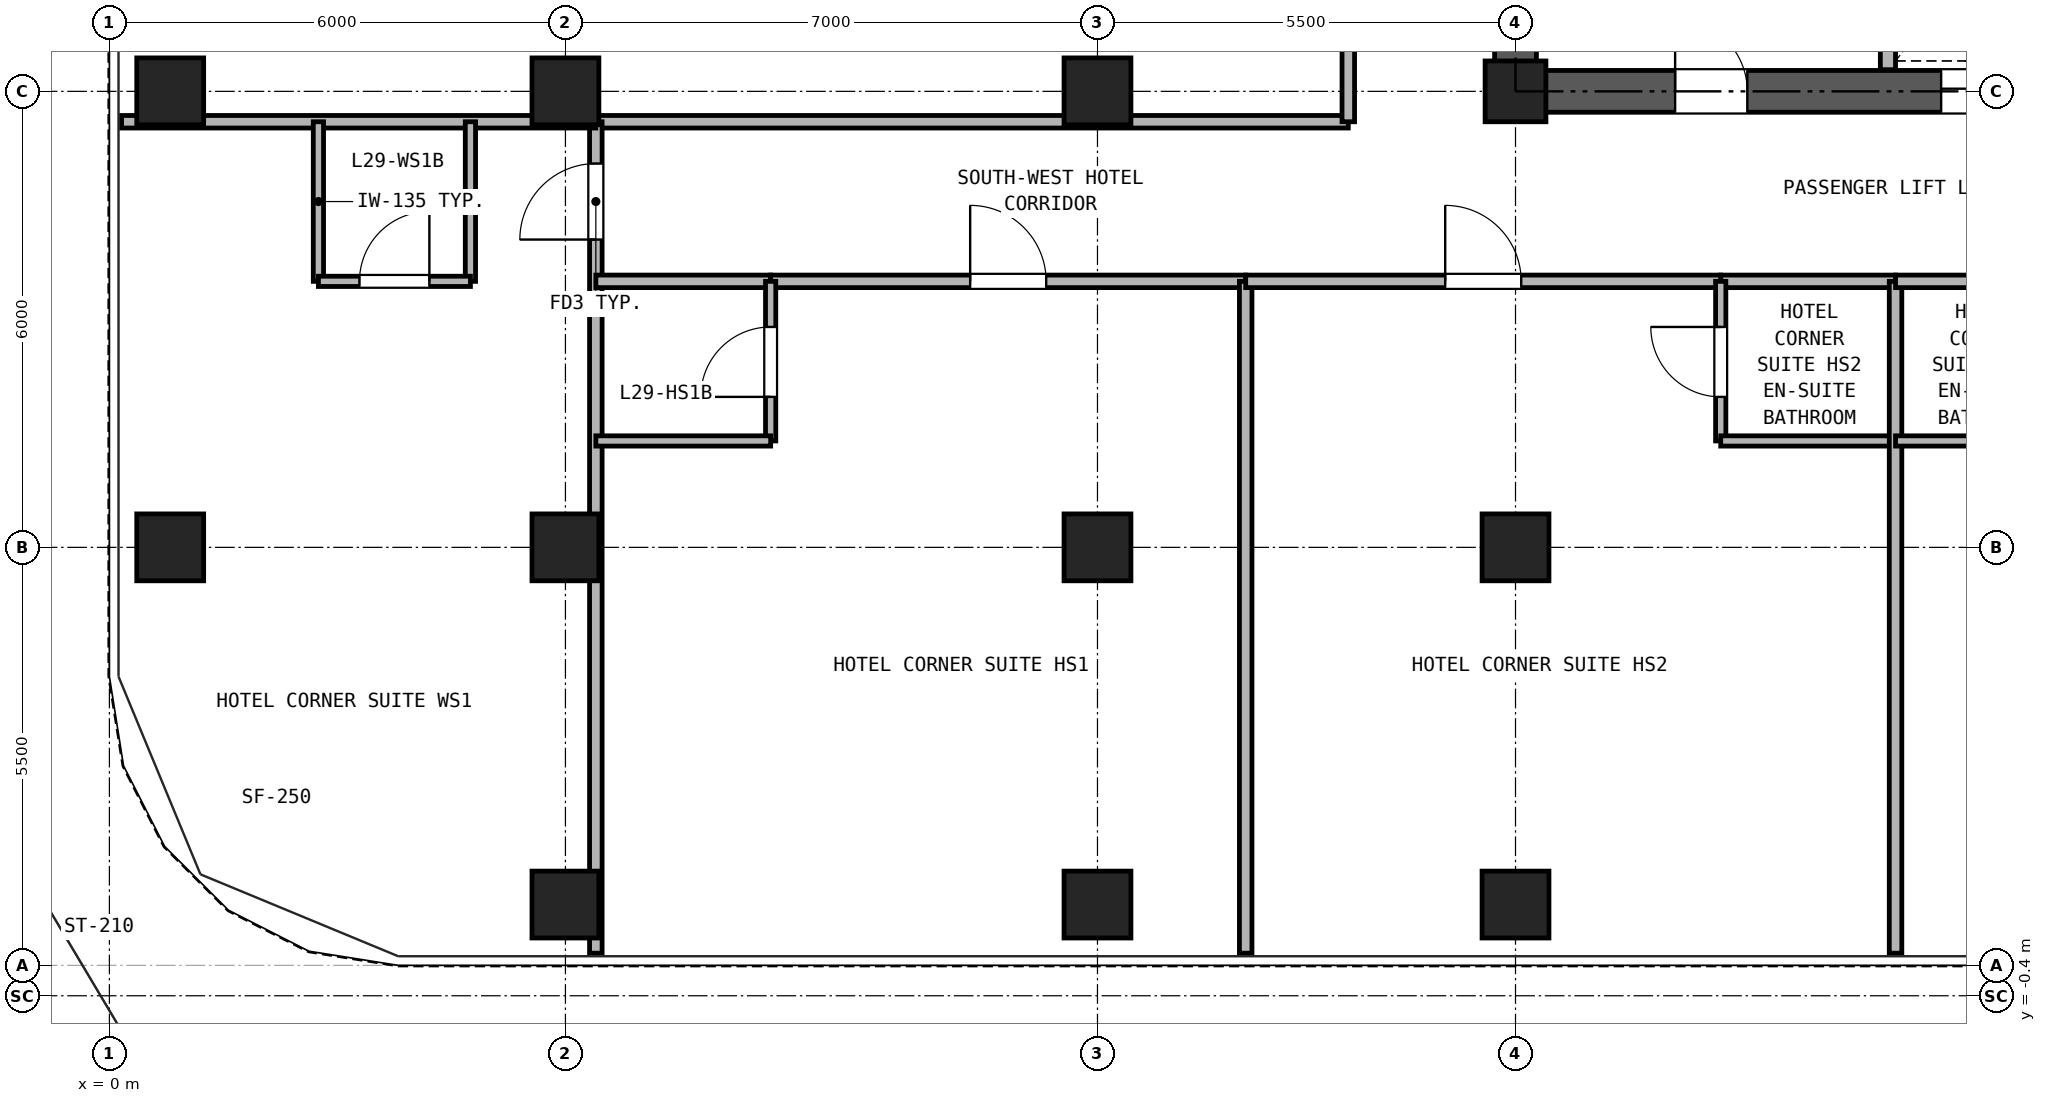
"""IFC4 building model, lengths in metres.
Left out: names, types, materials, properties, quantities, classifications, styles, units other than length and angle.
Written with IfcOpenShell. Run it as: python <this file> out.ifc"""

import sys

from ifc_helpers import new_model, si_unit, direction, frame, frame_2d, origin, origin_2d, place, context, subcontext, project, spatial, rectangle, hollow_rectangle, extrude, source, transform, mapped, element, fill, save


model = new_model("IFC4")
c1 = context("Model", 3, precision=1e-05, world=origin(), true_north=direction((0.0, 1.0)))
c2 = subcontext(c1, "Body", "Model", "MODEL_VIEW")
j1 = project(units=[si_unit("LENGTHUNIT", "METRE"), si_unit("PLANEANGLEUNIT", "RADIAN")], contexts=[c1])
p1 = place(None, origin())
s1 = spatial("IfcSite", under=j1, at=p1, CompositionType="ELEMENT")
p2 = place(p1, origin())
s2 = spatial("IfcBuilding", under=s1, at=p2, CompositionType="ELEMENT")
p3 = place(p2, frame((0.0, 0.0, 108.7)))
s3 = spatial("IfcBuildingStorey", under=s2, at=p3, CompositionType="ELEMENT", Elevation=108.7)
m1 = source(origin(), c2, "Body", "SweptSolid", [
    extrude(hollow_rectangle(XDim=0.88, YDim=0.88, WallThickness=0.05, at=origin_2d()), origin(), (0.0, 0.0, 1.0), 2.95),
])
for number, where, z_axis, x_axis in (
    (1, (6.0, 0.8, 0.0), (0.0, 0.0, 1.0), (1.0, 0.0, 0.0)),
    (2, (13.0, 0.8, 0.0), (0.0, 0.0, 1.0), (1.0, 0.0, 0.0)),
    (3, (18.5, 0.8, 0.0), (0.0, 0.0, 1.0), (1.0, 0.0, 0.0)),
    (4, (0.8, 5.5, 0.0), (0.0, 0.0, 1.0), (1.0, 0.0, 0.0)),
    (5, (0.8, 11.5, 0.0), (0.0, 0.0, 1.0), (1.0, 0.0, 0.0)),
    (6, (6.0, 5.5, 0.0), (0.0, 0.0, 1.0), (1.0, 0.0, 0.0)),
    (7, (6.0, 11.5, 0.0), (0.0, 0.0, 1.0), (1.0, 0.0, 0.0)),
    (8, (13.0, 5.5, 0.0), (0.0, 0.0, 1.0), (1.0, 0.0, 0.0)),
    (9, (13.0, 11.5, 0.0), (0.0, 0.0, 1.0), (1.0, 0.0, 0.0)),
    (10, (18.5, 5.5, 0.0), (0.0, 0.0, 1.0), (1.0, 0.0, 0.0)),
):
    element("IfcColumn", number, at=place(p3, frame(where, z_axis=z_axis, x_axis=x_axis)), inside=s3, PredefinedType="COLUMN", context=c2, shape_type="MappedRepresentation", body=[
        mapped(m1, transform((0.0, 0.0, 0.0), x_axis=(1.0, 0.0, 0.0), y_axis=(0.0, 1.0, 0.0), z_axis=(0.0, 0.0, 1.0), scale=1.0)),
    ])
m2 = source(origin(), c2, "Body", "SweptSolid", [
    extrude(hollow_rectangle(XDim=0.8, YDim=0.8, WallThickness=0.045, at=origin_2d()), origin(), (0.0, 0.0, 1.0), 2.95),
])
p4 = place(p3, frame((18.5, 11.5, 0.0), z_axis=(0.0, 0.0, 1.0), x_axis=(1.0, 0.0, 0.0)))
e11 = element("IfcColumn", 11, at=p4, inside=s3, PredefinedType="COLUMN", context=c2, shape_type="MappedRepresentation", body=[
    mapped(m2, transform((0.0, 0.0, 0.0), x_axis=(1.0, 0.0, 0.0), y_axis=(0.0, 1.0, 0.0), z_axis=(0.0, 0.0, 1.0), scale=1.0)),
])
p5 = place(p3, frame((18.225, 11.5, 0.0), z_axis=(0.0, 0.0, 1.0), x_axis=(1.0, 0.0, 0.0)))
e12 = element("IfcWall", 12, at=p5, inside=s3, PredefinedType="SHEAR", context=c2, shape_type="SweptSolid", body=[
    extrude(rectangle(XDim=10.55, YDim=0.55, at=frame_2d((5.275, 0.0))), origin(), (0.0, 0.0, 1.0), 2.95),
])
p6 = place(p5, frame((2.375, 0.0, 0.0)))
e13 = element("IfcOpeningElement", 13, at=p6, cuts=e12, PredefinedType="OPENING", context=c2, shape_type="SweptSolid", body=[
    extrude(rectangle(XDim=0.95, YDim=2.15, at=frame_2d((0.475, 1.075))), frame((0.0, 0.285, 0.0), z_axis=(0.0, -1.0, 0.0), x_axis=(1.0, 0.0, 0.0)), (0.0, 0.0, 1.0), 0.57),
])
p7 = place(p5, frame((5.875, 0.0, 0.0)))
e14 = element("IfcOpeningElement", 14, at=p7, cuts=e12, PredefinedType="OPENING", context=c2, shape_type="SweptSolid", body=[
    extrude(rectangle(XDim=1.1, YDim=2.25, at=frame_2d((0.55, 1.125))), frame((0.0, 0.285, 0.0), z_axis=(0.0, -1.0, 0.0), x_axis=(1.0, 0.0, 0.0)), (0.0, 0.0, 1.0), 0.57),
])
p8 = place(p5, frame((8.275, 0.0, 0.0)))
e15 = element("IfcOpeningElement", 15, at=p8, cuts=e12, PredefinedType="OPENING", context=c2, shape_type="SweptSolid", body=[
    extrude(rectangle(XDim=1.1, YDim=2.25, at=frame_2d((0.55, 1.125))), frame((0.0, 0.285, 0.0), z_axis=(0.0, -1.0, 0.0), x_axis=(1.0, 0.0, 0.0)), (0.0, 0.0, 1.0), 0.57),
])
p9 = place(p3, frame((18.5, 11.775, 0.0), z_axis=(0.0, 0.0, 1.0), x_axis=(0.0, 1.0, 0.0)))
e16 = element("IfcWall", 16, at=p9, inside=s3, PredefinedType="SHEAR", context=c2, shape_type="SweptSolid", body=[
    extrude(rectangle(XDim=16.7, YDim=0.55, at=frame_2d((8.35, 0.0))), origin(), (0.0, 0.0, 1.0), 2.95),
])
p10 = place(p9, frame((7.375, 0.0, 0.0)))
e17 = element("IfcOpeningElement", 17, at=p10, cuts=e16, PredefinedType="OPENING", context=c2, shape_type="SweptSolid", body=[
    extrude(rectangle(XDim=1.15, YDim=2.2, at=frame_2d((0.575, 1.1))), frame((0.0, 0.285, 0.0), z_axis=(0.0, -1.0, 0.0), x_axis=(1.0, 0.0, 0.0)), (0.0, 0.0, 1.0), 0.57),
])
p11 = place(p3, frame((23.4, 11.785, 0.0), z_axis=(0.0, 0.0, 1.0), x_axis=(0.0, 1.0, 0.0)))
e18 = element("IfcWall", 18, at=p11, inside=s3, PredefinedType="PARTITIONING", context=c2, shape_type="SweptSolid", body=[
    extrude(rectangle(XDim=3.215, YDim=0.2, at=frame_2d((1.607, 0.0))), origin(), (0.0, 0.0, 1.0), 2.95),
])
p12 = place(p3, frame((6.4, 11.1, 0.0), z_axis=(0.0, 0.0, 1.0), x_axis=(1.0, 0.0, 0.0)))
e19 = element("IfcWall", 19, at=p12, inside=s3, PredefinedType="PARTITIONING", context=c2, shape_type="SweptSolid", body=[
    extrude(rectangle(XDim=9.9, YDim=0.165, at=frame_2d((4.95, 0.0))), origin(), (0.0, 0.0, 1.0), 2.95),
])
p13 = place(p3, frame((16.3, 11.1, 0.0), z_axis=(0.0, 0.0, 1.0), x_axis=(0.0, 1.0, 0.0)))
e20 = element("IfcWall", 20, at=p13, inside=s3, PredefinedType="PARTITIONING", context=c2, shape_type="SweptSolid", body=[
    extrude(rectangle(XDim=18.45, YDim=0.165, at=frame_2d((9.225, 0.0))), origin(), (0.0, 0.0, 1.0), 2.95),
])
p14 = place(p13, frame((2.5, 0.0, 0.0)))
e21 = element("IfcOpeningElement", 21, at=p14, cuts=e20, PredefinedType="OPENING", context=c2, shape_type="SweptSolid", body=[
    extrude(rectangle(XDim=0.95, YDim=2.15, at=frame_2d((0.475, 1.075))), frame((0.0, 0.093, 0.0), z_axis=(0.0, -1.0, 0.0), x_axis=(1.0, 0.0, 0.0)), (0.0, 0.0, 1.0), 0.185),
])
p15 = place(p13, frame((8.5, 0.0, 0.0)))
e22 = element("IfcOpeningElement", 22, at=p15, cuts=e20, PredefinedType="OPENING", context=c2, shape_type="SweptSolid", body=[
    extrude(rectangle(XDim=0.95, YDim=2.15, at=frame_2d((0.475, 1.075))), frame((0.0, 0.093, 0.0), z_axis=(0.0, -1.0, 0.0), x_axis=(1.0, 0.0, 0.0)), (0.0, 0.0, 1.0), 0.185),
])
p16 = place(p13, frame((14.725, 0.0, 0.0)))
e23 = element("IfcOpeningElement", 23, at=p16, cuts=e20, PredefinedType="OPENING", context=c2, shape_type="SweptSolid", body=[
    extrude(rectangle(XDim=0.95, YDim=2.15, at=frame_2d((0.475, 1.075))), frame((0.0, 0.093, 0.0), z_axis=(0.0, -1.0, 0.0), x_axis=(1.0, 0.0, 0.0)), (0.0, 0.0, 1.0), 0.185),
])
p17 = place(p3, frame((6.4, 0.16, 0.0), z_axis=(0.0, 0.0, 1.0), x_axis=(0.0, 1.0, 0.0)))
e24 = element("IfcWall", 24, at=p17, inside=s3, PredefinedType="PARTITIONING", context=c2, shape_type="SweptSolid", body=[
    extrude(rectangle(XDim=10.94, YDim=0.165, at=frame_2d((5.47, 0.0))), origin(), (0.0, 0.0, 1.0), 2.95),
])
p18 = place(p17, frame((9.39, 0.0, 0.0)))
e25 = element("IfcOpeningElement", 25, at=p18, cuts=e24, PredefinedType="OPENING", context=c2, shape_type="SweptSolid", body=[
    extrude(rectangle(XDim=1.0, YDim=2.15, at=frame_2d((0.5, 1.075))), frame((0.0, 0.093, 0.0), z_axis=(0.0, -1.0, 0.0), x_axis=(1.0, 0.0, 0.0)), (0.0, 0.0, 1.0), 0.185),
])
p19 = place(p3, frame((0.16, 11.1, 0.0), z_axis=(0.0, 0.0, 1.0), x_axis=(1.0, 0.0, 0.0)))
e26 = element("IfcWall", 26, at=p19, inside=s3, PredefinedType="PARTITIONING", context=c2, shape_type="SweptSolid", body=[
    extrude(rectangle(XDim=6.24, YDim=0.165, at=frame_2d((3.12, 0.0))), origin(), (0.0, 0.0, 1.0), 2.95),
])
for number, where, z_axis, x_axis in (
    (27, (2.75, 9.0, 0.0), (0.0, 0.0, 1.0), (0.0, 1.0, 0.0)),
    (28, (4.75, 9.0, 0.0), (0.0, 0.0, 1.0), (0.0, 1.0, 0.0)),
):
    element("IfcWall", number, at=place(p3, frame(where, z_axis=z_axis, x_axis=x_axis)), inside=s3, PredefinedType="PARTITIONING", context=c2, shape_type="SweptSolid", body=[
        extrude(rectangle(XDim=2.1, YDim=0.135, at=frame_2d((1.05, 0.0))), origin(), (0.0, 0.0, 1.0), 2.95),
    ])
p20 = place(p3, frame((2.75, 9.0, 0.0), z_axis=(0.0, 0.0, 1.0), x_axis=(1.0, 0.0, 0.0)))
e29 = element("IfcWall", 29, at=p20, inside=s3, PredefinedType="PARTITIONING", context=c2, shape_type="SweptSolid", body=[
    extrude(rectangle(XDim=2.0, YDim=0.135, at=frame_2d((1.0, 0.0))), origin(), (0.0, 0.0, 1.0), 2.95),
])
p21 = place(p20, frame((0.54, 0.0, 0.0)))
e30 = element("IfcOpeningElement", 30, at=p21, cuts=e29, PredefinedType="OPENING", context=c2, shape_type="SweptSolid", body=[
    extrude(rectangle(XDim=0.92, YDim=2.1, at=frame_2d((0.46, 1.05))), frame((0.0, 0.077, 0.0), z_axis=(0.0, -1.0, 0.0), x_axis=(1.0, 0.0, 0.0)), (0.0, 0.0, 1.0), 0.155),
])
p22 = place(p3, frame((6.4, 9.0, 0.0), z_axis=(0.0, 0.0, 1.0), x_axis=(1.0, 0.0, 0.0)))
e31 = element("IfcWall", 31, at=p22, inside=s3, PredefinedType="PARTITIONING", context=c2, shape_type="SweptSolid", body=[
    extrude(rectangle(XDim=2.3, YDim=0.165, at=frame_2d((1.15, 0.0))), origin(), (0.0, 0.0, 1.0), 2.95),
])
p23 = place(p3, frame((8.7, 9.0, 0.0), z_axis=(0.0, 0.0, 1.0), x_axis=(1.0, 0.0, 0.0)))
e32 = element("IfcWall", 32, at=p23, inside=s3, PredefinedType="PARTITIONING", context=c2, shape_type="SweptSolid", body=[
    extrude(rectangle(XDim=6.25, YDim=0.165, at=frame_2d((3.125, 0.0))), origin(), (0.0, 0.0, 1.0), 2.95),
])
p24 = place(p23, frame((2.625, 0.0, 0.0)))
e33 = element("IfcOpeningElement", 33, at=p24, cuts=e32, PredefinedType="OPENING", context=c2, shape_type="SweptSolid", body=[
    extrude(rectangle(XDim=1.0, YDim=2.15, at=frame_2d((0.5, 1.075))), frame((0.0, 0.093, 0.0), z_axis=(0.0, -1.0, 0.0), x_axis=(1.0, 0.0, 0.0)), (0.0, 0.0, 1.0), 0.185),
])
p25 = place(p3, frame((8.7, 6.9, 0.0), z_axis=(0.0, 0.0, 1.0), x_axis=(0.0, 1.0, 0.0)))
e34 = element("IfcWall", 34, at=p25, inside=s3, PredefinedType="PARTITIONING", context=c2, shape_type="SweptSolid", body=[
    extrude(rectangle(XDim=2.1, YDim=0.135, at=frame_2d((1.05, 0.0))), origin(), (0.0, 0.0, 1.0), 2.95),
])
p26 = place(p25, frame((0.58, 0.0, 0.0)))
e35 = element("IfcOpeningElement", 35, at=p26, cuts=e34, PredefinedType="OPENING", context=c2, shape_type="SweptSolid", body=[
    extrude(rectangle(XDim=0.92, YDim=2.1, at=frame_2d((0.46, 1.05))), frame((0.0, 0.077, 0.0), z_axis=(0.0, -1.0, 0.0), x_axis=(1.0, 0.0, 0.0)), (0.0, 0.0, 1.0), 0.155),
])
p27 = place(p3, frame((6.4, 6.9, 0.0), z_axis=(0.0, 0.0, 1.0), x_axis=(1.0, 0.0, 0.0)))
e36 = element("IfcWall", 36, at=p27, inside=s3, PredefinedType="PARTITIONING", context=c2, shape_type="SweptSolid", body=[
    extrude(rectangle(XDim=2.3, YDim=0.135, at=frame_2d((1.15, 0.0))), origin(), (0.0, 0.0, 1.0), 2.95),
])
p28 = place(p3, frame((14.95, 0.16, 0.0), z_axis=(0.0, 0.0, 1.0), x_axis=(0.0, 1.0, 0.0)))
e37 = element("IfcWall", 37, at=p28, inside=s3, PredefinedType="PARTITIONING", context=c2, shape_type="SweptSolid", body=[
    extrude(rectangle(XDim=8.84, YDim=0.165, at=frame_2d((4.42, 0.0))), origin(), (0.0, 0.0, 1.0), 2.95),
])
p29 = place(p3, frame((21.2, 9.0, 0.0), z_axis=(0.0, 0.0, 1.0), x_axis=(1.0, 0.0, 0.0)))
e38 = element("IfcWall", 38, at=p29, inside=s3, PredefinedType="PARTITIONING", context=c2, shape_type="SweptSolid", body=[
    extrude(rectangle(XDim=2.3, YDim=0.165, at=frame_2d((1.15, 0.0))), origin(), (0.0, 0.0, 1.0), 2.95),
])
p30 = place(p3, frame((14.95, 9.0, 0.0), z_axis=(0.0, 0.0, 1.0), x_axis=(1.0, 0.0, 0.0)))
e39 = element("IfcWall", 39, at=p30, inside=s3, PredefinedType="PARTITIONING", context=c2, shape_type="SweptSolid", body=[
    extrude(rectangle(XDim=6.25, YDim=0.165, at=frame_2d((3.125, 0.0))), origin(), (0.0, 0.0, 1.0), 2.95),
])
p31 = place(p30, frame((2.625, 0.0, 0.0)))
e40 = element("IfcOpeningElement", 40, at=p31, cuts=e39, PredefinedType="OPENING", context=c2, shape_type="SweptSolid", body=[
    extrude(rectangle(XDim=1.0, YDim=2.15, at=frame_2d((0.5, 1.075))), frame((0.0, 0.093, 0.0), z_axis=(0.0, -1.0, 0.0), x_axis=(1.0, 0.0, 0.0)), (0.0, 0.0, 1.0), 0.185),
])
p32 = place(p3, frame((21.2, 6.9, 0.0), z_axis=(0.0, 0.0, 1.0), x_axis=(0.0, 1.0, 0.0)))
e41 = element("IfcWall", 41, at=p32, inside=s3, PredefinedType="PARTITIONING", context=c2, shape_type="SweptSolid", body=[
    extrude(rectangle(XDim=2.1, YDim=0.135, at=frame_2d((1.05, 0.0))), origin(), (0.0, 0.0, 1.0), 2.95),
])
p33 = place(p32, frame((0.58, 0.0, 0.0)))
e42 = element("IfcOpeningElement", 42, at=p33, cuts=e41, PredefinedType="OPENING", context=c2, shape_type="SweptSolid", body=[
    extrude(rectangle(XDim=0.92, YDim=2.1, at=frame_2d((0.46, 1.05))), frame((0.0, 0.077, 0.0), z_axis=(0.0, -1.0, 0.0), x_axis=(1.0, 0.0, 0.0)), (0.0, 0.0, 1.0), 0.155),
])
p34 = place(p3, frame((21.2, 6.9, 0.0), z_axis=(0.0, 0.0, 1.0), x_axis=(1.0, 0.0, 0.0)))
e43 = element("IfcWall", 43, at=p34, inside=s3, PredefinedType="PARTITIONING", context=c2, shape_type="SweptSolid", body=[
    extrude(rectangle(XDim=2.3, YDim=0.135, at=frame_2d((1.15, 0.0))), origin(), (0.0, 0.0, 1.0), 2.95),
])
p35 = place(p3, frame((23.5, 0.16, 0.0), z_axis=(0.0, 0.0, 1.0), x_axis=(0.0, 1.0, 0.0)))
e44 = element("IfcWall", 44, at=p35, inside=s3, PredefinedType="PARTITIONING", context=c2, shape_type="SweptSolid", body=[
    extrude(rectangle(XDim=8.84, YDim=0.165, at=frame_2d((4.42, 0.0))), origin(), (0.0, 0.0, 1.0), 2.95),
])
p36 = place(p3, frame((23.5, 9.0, 0.0), z_axis=(0.0, 0.0, 1.0), x_axis=(1.0, 0.0, 0.0)))
e45 = element("IfcWall", 45, at=p36, inside=s3, PredefinedType="PARTITIONING", context=c2, shape_type="SweptSolid", body=[
    extrude(rectangle(XDim=2.3, YDim=0.165, at=frame_2d((1.15, 0.0))), origin(), (0.0, 0.0, 1.0), 2.95),
])
p37 = place(p3, frame((23.5, 6.9, 0.0), z_axis=(0.0, 0.0, 1.0), x_axis=(1.0, 0.0, 0.0)))
e46 = element("IfcWall", 46, at=p37, inside=s3, PredefinedType="PARTITIONING", context=c2, shape_type="SweptSolid", body=[
    extrude(rectangle(XDim=2.3, YDim=0.135, at=frame_2d((1.15, 0.0))), origin(), (0.0, 0.0, 1.0), 2.95),
])
p38 = place(p6, frame((0.95, 0.0, 0.0), z_axis=(0.0, 0.0, 1.0), x_axis=(-1.0, 0.0, 0.0)))
e47 = element("IfcDoor", 47, at=p38, inside=s3, OperationType="SINGLE_SWING_LEFT", PredefinedType="DOOR", context=c2, shape_type="SweptSolid", body=[
    extrude(rectangle(XDim=0.95, YDim=2.15, at=frame_2d((0.475, 1.075))), frame((0.0, 0.025, 0.0), z_axis=(0.0, -1.0, 0.0), x_axis=(1.0, 0.0, 0.0)), (0.0, 0.0, 1.0), 0.05),
])
fill(e13, e47)
p39 = place(p7, frame((1.1, 0.0, 0.0), z_axis=(0.0, 0.0, 1.0), x_axis=(-1.0, 0.0, 0.0)))
e48 = element("IfcDoor", 48, at=p39, inside=s3, OperationType="DOUBLE_DOOR_SLIDING", PredefinedType="DOOR", context=c2, shape_type="SweptSolid", body=[
    extrude(rectangle(XDim=1.1, YDim=2.25, at=frame_2d((0.55, 1.125))), frame((0.0, 0.025, 0.0), z_axis=(0.0, -1.0, 0.0), x_axis=(1.0, 0.0, 0.0)), (0.0, 0.0, 1.0), 0.05),
])
fill(e14, e48)
p40 = place(p21, origin())
e49 = element("IfcDoor", 49, at=p40, inside=s3, OperationType="SINGLE_SWING_RIGHT", PredefinedType="DOOR", context=c2, shape_type="SweptSolid", body=[
    extrude(rectangle(XDim=0.92, YDim=2.1, at=frame_2d((0.46, 1.05))), frame((0.0, 0.025, 0.0), z_axis=(0.0, -1.0, 0.0), x_axis=(1.0, 0.0, 0.0)), (0.0, 0.0, 1.0), 0.05),
])
fill(e30, e49)
p41 = place(p18, origin())
e50 = element("IfcDoor", 50, at=p41, inside=s3, OperationType="SINGLE_SWING_LEFT", PredefinedType="DOOR", context=c2, shape_type="SweptSolid", body=[
    extrude(rectangle(XDim=1.0, YDim=2.15, at=frame_2d((0.5, 1.075))), frame((0.0, 0.025, 0.0), z_axis=(0.0, -1.0, 0.0), x_axis=(1.0, 0.0, 0.0)), (0.0, 0.0, 1.0), 0.05),
])
fill(e25, e50)
p42 = place(p26, frame((0.92, 0.0, 0.0), z_axis=(0.0, 0.0, 1.0), x_axis=(-1.0, 0.0, 0.0)))
e51 = element("IfcDoor", 51, at=p42, inside=s3, OperationType="SINGLE_SWING_LEFT", PredefinedType="DOOR", context=c2, shape_type="SweptSolid", body=[
    extrude(rectangle(XDim=0.92, YDim=2.1, at=frame_2d((0.46, 1.05))), frame((0.0, 0.025, 0.0), z_axis=(0.0, -1.0, 0.0), x_axis=(1.0, 0.0, 0.0)), (0.0, 0.0, 1.0), 0.05),
])
fill(e35, e51)
p43 = place(p24, frame((1.0, 0.0, 0.0), z_axis=(0.0, 0.0, 1.0), x_axis=(-1.0, 0.0, 0.0)))
e52 = element("IfcDoor", 52, at=p43, inside=s3, OperationType="SINGLE_SWING_LEFT", PredefinedType="DOOR", context=c2, shape_type="SweptSolid", body=[
    extrude(rectangle(XDim=1.0, YDim=2.15, at=frame_2d((0.5, 1.075))), frame((0.0, 0.025, 0.0), z_axis=(0.0, -1.0, 0.0), x_axis=(1.0, 0.0, 0.0)), (0.0, 0.0, 1.0), 0.05),
])
fill(e33, e52)
p44 = place(p33, origin())
e53 = element("IfcDoor", 53, at=p44, inside=s3, OperationType="SINGLE_SWING_RIGHT", PredefinedType="DOOR", context=c2, shape_type="SweptSolid", body=[
    extrude(rectangle(XDim=0.92, YDim=2.1, at=frame_2d((0.46, 1.05))), frame((0.0, 0.025, 0.0), z_axis=(0.0, -1.0, 0.0), x_axis=(1.0, 0.0, 0.0)), (0.0, 0.0, 1.0), 0.05),
])
fill(e42, e53)
p45 = place(p31, frame((1.0, 0.0, 0.0), z_axis=(0.0, 0.0, 1.0), x_axis=(-1.0, 0.0, 0.0)))
e54 = element("IfcDoor", 54, at=p45, inside=s3, OperationType="SINGLE_SWING_LEFT", PredefinedType="DOOR", context=c2, shape_type="SweptSolid", body=[
    extrude(rectangle(XDim=1.0, YDim=2.15, at=frame_2d((0.5, 1.075))), frame((0.0, 0.025, 0.0), z_axis=(0.0, -1.0, 0.0), x_axis=(1.0, 0.0, 0.0)), (0.0, 0.0, 1.0), 0.05),
])
fill(e40, e54)
save(model, sys.argv[1])
